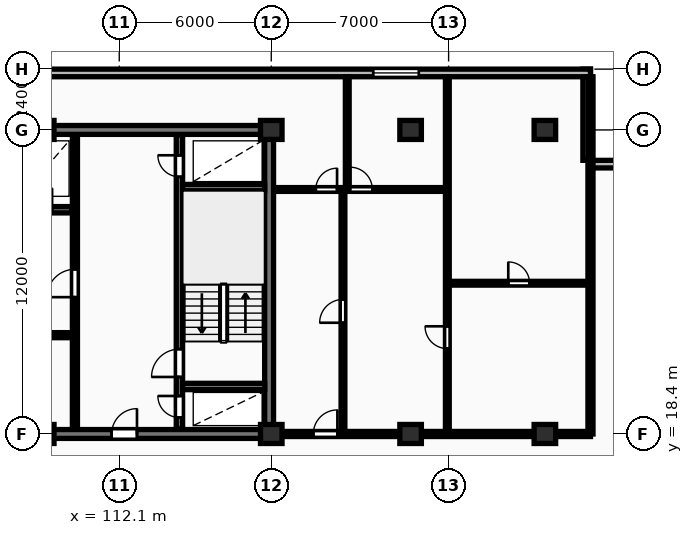
"""IFC4 building model, lengths in metres.
Left out: names, types, materials, properties, quantities, classifications, styles, units other than length and angle.
Written with IfcOpenShell. Run it as: python <this file> out.ifc"""

import sys

from ifc_helpers import new_model, si_unit, direction, frame, frame_2d, origin, origin_2d, place, context, subcontext, project, spatial, rectangle, extrude, element, fill, save


model = new_model("IFC4")
c1 = context("Model", 3, precision=1e-05, world=origin(), true_north=direction((0.0, 1.0)))
c2 = subcontext(c1, "Body", "Model", "MODEL_VIEW")
j1 = project(units=[si_unit("LENGTHUNIT", "METRE"), si_unit("PLANEANGLEUNIT", "RADIAN")], contexts=[c1])
p1 = place(None, origin())
s1 = spatial("IfcSite", under=j1, at=p1, CompositionType="ELEMENT")
p2 = place(p1, origin())
s2 = spatial("IfcBuilding", under=s1, at=p2, CompositionType="ELEMENT")
p3 = place(p2, frame((0.0, 0.0, 106.8)))
s3 = spatial("IfcBuildingStorey", under=s2, at=p3, CompositionType="ELEMENT", Elevation=106.8)
for number, where, z_axis, x_axis in (
    (1, (109.1, 18.4, 0.0), (0.0, 0.0, 1.0), (1.0, 0.0, 0.0)),
    (2, (109.1, 30.4, 0.0), (0.0, 0.0, 1.0), (1.0, 0.0, 0.0)),
    (3, (118.1, 18.4, 0.0), (0.0, 0.0, 1.0), (1.0, 0.0, 0.0)),
    (4, (118.1, 30.4, 0.0), (0.0, 0.0, 1.0), (1.0, 0.0, 0.0)),
    (5, (123.6, 18.4, 0.0), (0.0, 0.0, 1.0), (1.0, 0.0, 0.0)),
    (6, (123.6, 30.4, 0.0), (0.0, 0.0, 1.0), (1.0, 0.0, 0.0)),
    (7, (128.9, 18.4, 0.0), (0.0, 0.0, 1.0), (1.0, 0.0, 0.0)),
    (8, (128.9, 30.4, 0.0), (0.0, 0.0, 1.0), (1.0, 0.0, 0.0)),
):
    element("IfcColumn", number, at=place(p3, frame(where, z_axis=z_axis, x_axis=x_axis)), inside=s3, PredefinedType="COLUMN", context=c2, shape_type="SweptSolid", body=[
        extrude(rectangle(XDim=0.85, YDim=0.75, at=origin_2d()), origin(), (0.0, 0.0, 1.0), 3.25),
    ])
for number, where, z_axis, x_axis in (
    (9, (134.3, 29.05, 0.0), (0.0, 0.0, 1.0), (-1.0, 0.0, 0.0)),
    (10, (130.55, 29.2, 0.0), (0.0, 0.0, 1.0), (0.0, 1.0, 0.0)),
):
    element("IfcWall", number, at=place(p3, frame(where, z_axis=z_axis, x_axis=x_axis)), inside=s3, PredefinedType="STANDARD", context=c2, shape_type="SweptSolid", body=[
        extrude(rectangle(XDim=3.6, YDim=0.3, at=frame_2d((1.8, 0.0))), origin(), (0.0, 0.0, 1.0), 2.97),
    ])
p4 = place(p3, frame((130.7, 32.65, 0.0), z_axis=(0.0, 0.0, 1.0), x_axis=(-1.0, 0.0, 0.0)))
e11 = element("IfcWall", 11, at=p4, inside=s3, PredefinedType="STANDARD", context=c2, shape_type="SweptSolid", body=[
    extrude(rectangle(XDim=58.0, YDim=0.3, at=frame_2d((29.0, 0.0))), origin(), (0.0, 0.0, 1.0), 2.97),
])
p5 = place(p4, frame((50.125, 0.0, 0.85)))
e12 = element("IfcOpeningElement", 12, at=p5, cuts=e11, PredefinedType="OPENING", context=c2, shape_type="SweptSolid", body=[
    extrude(rectangle(XDim=1.8, YDim=1.8, at=frame_2d((0.9, 0.9))), frame((0.0, 0.16, 0.0), z_axis=(0.0, -1.0, 0.0), x_axis=(1.0, 0.0, 0.0)), (0.0, 0.0, 1.0), 0.32),
])
p6 = place(p4, frame((6.775, 0.0, 0.85)))
e13 = element("IfcOpeningElement", 13, at=p6, cuts=e11, PredefinedType="OPENING", context=c2, shape_type="SweptSolid", body=[
    extrude(rectangle(XDim=1.8, YDim=1.8, at=frame_2d((0.9, 0.9))), frame((0.0, 0.16, 0.0), z_axis=(0.0, -1.0, 0.0), x_axis=(1.0, 0.0, 0.0)), (0.0, 0.0, 1.0), 0.32),
])
p7 = place(p3, frame((81.925, 30.4, 0.0), z_axis=(0.0, 0.0, 1.0), x_axis=(1.0, 0.0, 0.0)))
e14 = element("IfcWall", 14, at=p7, inside=s3, PredefinedType="SHEAR", context=c2, shape_type="SweptSolid", body=[
    extrude(rectangle(XDim=36.265, YDim=0.35, at=frame_2d((18.132, 0.0))), origin(), (0.0, 0.0, 1.0), 3.25),
])
p8 = place(p3, frame((118.015, 18.575, 0.0), z_axis=(0.0, 0.0, 1.0), x_axis=(0.0, 1.0, 0.0)))
e15 = element("IfcWall", 15, at=p8, inside=s3, PredefinedType="SHEAR", context=c2, shape_type="SweptSolid", body=[
    extrude(rectangle(XDim=11.65, YDim=0.35, at=frame_2d((5.825, 0.0))), origin(), (0.0, 0.0, 1.0), 3.25),
])
p9 = place(p3, frame((81.925, 18.4, 0.0), z_axis=(0.0, 0.0, 1.0), x_axis=(1.0, 0.0, 0.0)))
e16 = element("IfcWall", 16, at=p9, inside=s3, PredefinedType="SHEAR", context=c2, shape_type="SweptSolid", body=[
    extrude(rectangle(XDim=36.265, YDim=0.35, at=frame_2d((18.132, 0.0))), origin(), (0.0, 0.0, 1.0), 3.25),
])
p10 = place(p9, frame((5.675, 0.0, 0.0)))
e17 = element("IfcOpeningElement", 17, at=p10, cuts=e16, PredefinedType="OPENING", context=c2, shape_type="SweptSolid", body=[
    extrude(rectangle(XDim=1.0, YDim=2.15, at=frame_2d((0.5, 1.075))), frame((0.0, 0.185, 0.0), z_axis=(0.0, -1.0, 0.0), x_axis=(1.0, 0.0, 0.0)), (0.0, 0.0, 1.0), 0.37),
])
p11 = place(p9, frame((21.925, 0.0, 0.0)))
e18 = element("IfcOpeningElement", 18, at=p11, cuts=e16, PredefinedType="OPENING", context=c2, shape_type="SweptSolid", body=[
    extrude(rectangle(XDim=1.5, YDim=2.2, at=frame_2d((0.75, 1.1))), frame((0.0, 0.185, 0.0), z_axis=(0.0, -1.0, 0.0), x_axis=(1.0, 0.0, 0.0)), (0.0, 0.0, 1.0), 0.37),
])
p12 = place(p9, frame((29.875, 0.0, 0.0)))
e19 = element("IfcOpeningElement", 19, at=p12, cuts=e16, PredefinedType="OPENING", context=c2, shape_type="SweptSolid", body=[
    extrude(rectangle(XDim=1.0, YDim=2.15, at=frame_2d((0.5, 1.075))), frame((0.0, 0.185, 0.0), z_axis=(0.0, -1.0, 0.0), x_axis=(1.0, 0.0, 0.0)), (0.0, 0.0, 1.0), 0.37),
])
p13 = place(p3, frame((99.68, 27.25, 0.0), z_axis=(0.0, 0.0, 1.0), x_axis=(1.0, 0.0, 0.0)))
e20 = element("IfcWall", 20, at=p13, inside=s3, PredefinedType="SHEAR", context=c2, shape_type="SweptSolid", body=[
    extrude(rectangle(XDim=10.54, YDim=0.25, at=frame_2d((5.27, 0.0))), origin(), (0.0, 0.0, 1.0), 3.25),
])
p14 = place(p13, frame((0.76, 0.0, 0.0)))
e21 = element("IfcOpeningElement", 21, at=p14, cuts=e20, PredefinedType="OPENING", context=c2, shape_type="SweptSolid", body=[
    extrude(rectangle(XDim=1.12, YDim=2.12, at=frame_2d((0.56, 1.06))), frame((0.0, 0.135, 0.0), z_axis=(0.0, -1.0, 0.0), x_axis=(1.0, 0.0, 0.0)), (0.0, 0.0, 1.0), 0.27),
])
p15 = place(p13, frame((3.56, 0.0, 0.0)))
e22 = element("IfcOpeningElement", 22, at=p15, cuts=e20, PredefinedType="OPENING", context=c2, shape_type="SweptSolid", body=[
    extrude(rectangle(XDim=1.12, YDim=2.12, at=frame_2d((0.56, 1.06))), frame((0.0, 0.135, 0.0), z_axis=(0.0, -1.0, 0.0), x_axis=(1.0, 0.0, 0.0)), (0.0, 0.0, 1.0), 0.27),
])
p16 = place(p13, frame((6.36, 0.0, 0.0)))
e23 = element("IfcOpeningElement", 23, at=p16, cuts=e20, PredefinedType="OPENING", context=c2, shape_type="SweptSolid", body=[
    extrude(rectangle(XDim=1.12, YDim=2.12, at=frame_2d((0.56, 1.06))), frame((0.0, 0.135, 0.0), z_axis=(0.0, -1.0, 0.0), x_axis=(1.0, 0.0, 0.0)), (0.0, 0.0, 1.0), 0.27),
])
p17 = place(p13, frame((8.92, 0.0, 0.0)))
e24 = element("IfcOpeningElement", 24, at=p17, cuts=e20, PredefinedType="OPENING", context=c2, shape_type="SweptSolid", body=[
    extrude(rectangle(XDim=0.85, YDim=2.05, at=frame_2d((0.425, 1.025))), frame((0.0, 0.135, 0.0), z_axis=(0.0, -1.0, 0.0), x_axis=(1.0, 0.0, 0.0)), (0.0, 0.0, 1.0), 0.27),
])
p18 = place(p3, frame((91.08, 22.3, 0.0), z_axis=(0.0, 0.0, 1.0), x_axis=(1.0, 0.0, 0.0)))
e25 = element("IfcWall", 25, at=p18, inside=s3, PredefinedType="PARTITIONING", context=c2, shape_type="SweptSolid", body=[
    extrude(rectangle(XDim=19.14, YDim=0.2, at=frame_2d((9.57, 0.0))), origin(), (0.0, 0.0, 1.0), 2.97),
])
p19 = place(p18, frame((1.15, 0.0, 0.0)))
e26 = element("IfcOpeningElement", 26, at=p19, cuts=e25, PredefinedType="OPENING", context=c2, shape_type="SweptSolid", body=[
    extrude(rectangle(XDim=0.85, YDim=2.05, at=frame_2d((0.425, 1.025))), frame((0.0, 0.11, 0.0), z_axis=(0.0, -1.0, 0.0), x_axis=(1.0, 0.0, 0.0)), (0.0, 0.0, 1.0), 0.22),
])
p20 = place(p18, frame((3.2, 0.0, 0.0)))
e27 = element("IfcOpeningElement", 27, at=p20, cuts=e25, PredefinedType="OPENING", context=c2, shape_type="SweptSolid", body=[
    extrude(rectangle(XDim=0.85, YDim=2.05, at=frame_2d((0.425, 1.025))), frame((0.0, 0.11, 0.0), z_axis=(0.0, -1.0, 0.0), x_axis=(1.0, 0.0, 0.0)), (0.0, 0.0, 1.0), 0.22),
])
p21 = place(p18, frame((12.72, 0.0, 0.0)))
e28 = element("IfcOpeningElement", 28, at=p21, cuts=e25, PredefinedType="OPENING", context=c2, shape_type="SweptSolid", body=[
    extrude(rectangle(XDim=1.5, YDim=2.2, at=frame_2d((0.75, 1.1))), frame((0.0, 0.11, 0.0), z_axis=(0.0, -1.0, 0.0), x_axis=(1.0, 0.0, 0.0)), (0.0, 0.0, 1.0), 0.22),
])
p22 = place(p18, frame((5.52, 0.0, 0.0)))
e29 = element("IfcOpeningElement", 29, at=p22, cuts=e25, PredefinedType="OPENING", context=c2, shape_type="SweptSolid", body=[
    extrude(rectangle(XDim=0.88, YDim=2.06, at=frame_2d((0.44, 1.03))), frame((0.0, 0.11, 0.0), z_axis=(0.0, -1.0, 0.0), x_axis=(1.0, 0.0, 0.0)), (0.0, 0.0, 1.0), 0.22),
])
p23 = place(p18, frame((7.67, 0.0, 0.0)))
e30 = element("IfcOpeningElement", 30, at=p23, cuts=e25, PredefinedType="OPENING", context=c2, shape_type="SweptSolid", body=[
    extrude(rectangle(XDim=0.88, YDim=2.06, at=frame_2d((0.44, 1.03))), frame((0.0, 0.11, 0.0), z_axis=(0.0, -1.0, 0.0), x_axis=(1.0, 0.0, 0.0)), (0.0, 0.0, 1.0), 0.22),
])
p24 = place(p18, frame((10.27, 0.0, 0.0)))
e31 = element("IfcOpeningElement", 31, at=p24, cuts=e25, PredefinedType="OPENING", context=c2, shape_type="SweptSolid", body=[
    extrude(rectangle(XDim=0.85, YDim=2.05, at=frame_2d((0.425, 1.025))), frame((0.0, 0.11, 0.0), z_axis=(0.0, -1.0, 0.0), x_axis=(1.0, 0.0, 0.0)), (0.0, 0.0, 1.0), 0.22),
])
p25 = place(p18, frame((15.92, 0.0, 0.0)))
e32 = element("IfcOpeningElement", 32, at=p25, cuts=e25, PredefinedType="OPENING", context=c2, shape_type="SweptSolid", body=[
    extrude(rectangle(XDim=0.96, YDim=2.1, at=frame_2d((0.48, 1.05))), frame((0.0, 0.11, 0.0), z_axis=(0.0, -1.0, 0.0), x_axis=(1.0, 0.0, 0.0)), (0.0, 0.0, 1.0), 0.22),
])
p26 = place(p3, frame((110.35, 18.6, 0.0), z_axis=(0.0, 0.0, 1.0), x_axis=(0.0, 1.0, 0.0)))
e33 = element("IfcWall", 33, at=p26, inside=s3, PredefinedType="PARTITIONING", context=c2, shape_type="SweptSolid", body=[
    extrude(rectangle(XDim=11.6, YDim=0.2, at=frame_2d((5.8, 0.0))), origin(), (0.0, 0.0, 1.0), 2.97),
])
p27 = place(p26, frame((5.2, 0.0, 0.0)))
e34 = element("IfcOpeningElement", 34, at=p27, cuts=e33, PredefinedType="OPENING", context=c2, shape_type="SweptSolid", body=[
    extrude(rectangle(XDim=1.1, YDim=2.15, at=frame_2d((0.55, 1.075))), frame((0.0, 0.11, 0.0), z_axis=(0.0, -1.0, 0.0), x_axis=(1.0, 0.0, 0.0)), (0.0, 0.0, 1.0), 0.22),
])
p28 = place(p3, frame((114.475, 18.6, 0.0), z_axis=(0.0, 0.0, 1.0), x_axis=(0.0, 1.0, 0.0)))
e35 = element("IfcWall", 35, at=p28, inside=s3, PredefinedType="SHEAR", context=c2, shape_type="SweptSolid", body=[
    extrude(rectangle(XDim=11.6, YDim=0.25, at=frame_2d((5.8, 0.0))), origin(), (0.0, 0.0, 1.0), 3.25),
])
p29 = place(p28, frame((0.45, 0.0, 0.0)))
e36 = element("IfcOpeningElement", 36, at=p29, cuts=e35, PredefinedType="OPENING", context=c2, shape_type="SweptSolid", body=[
    extrude(rectangle(XDim=0.85, YDim=2.05, at=frame_2d((0.425, 1.025))), frame((0.0, 0.135, 0.0), z_axis=(0.0, -1.0, 0.0), x_axis=(1.0, 0.0, 0.0)), (0.0, 0.0, 1.0), 0.27),
])
p30 = place(p28, frame((2.05, 0.0, 0.0)))
e37 = element("IfcOpeningElement", 37, at=p30, cuts=e35, PredefinedType="OPENING", context=c2, shape_type="SweptSolid", body=[
    extrude(rectangle(XDim=1.1, YDim=2.1, at=frame_2d((0.55, 1.05))), frame((0.0, 0.135, 0.0), z_axis=(0.0, -1.0, 0.0), x_axis=(1.0, 0.0, 0.0)), (0.0, 0.0, 1.0), 0.27),
])
p31 = place(p28, frame((9.95, 0.0, 0.0)))
e38 = element("IfcOpeningElement", 38, at=p31, cuts=e35, PredefinedType="OPENING", context=c2, shape_type="SweptSolid", body=[
    extrude(rectangle(XDim=0.85, YDim=2.05, at=frame_2d((0.425, 1.025))), frame((0.0, 0.135, 0.0), z_axis=(0.0, -1.0, 0.0), x_axis=(1.0, 0.0, 0.0)), (0.0, 0.0, 1.0), 0.27),
])
for number, where, z_axis, x_axis in (
    (39, (114.6, 20.275, 0.0), (0.0, 0.0, 1.0), (1.0, 0.0, 0.0)),
    (40, (114.6, 28.125, 0.0), (0.0, 0.0, 1.0), (1.0, 0.0, 0.0)),
):
    element("IfcWall", number, at=place(p3, frame(where, z_axis=z_axis, x_axis=x_axis)), inside=s3, PredefinedType="SHEAR", context=c2, shape_type="SweptSolid", body=[
        extrude(rectangle(XDim=3.24, YDim=0.25, at=frame_2d((1.62, 0.0))), origin(), (0.0, 0.0, 1.0), 3.25),
    ])
p32 = place(p3, frame((130.7, 18.4, 0.0), z_axis=(0.0, 0.0, 1.0), x_axis=(0.0, 1.0, 0.0)))
e41 = element("IfcWall", 41, at=p32, inside=s3, PredefinedType="PARTITIONING", context=c2, shape_type="SweptSolid", body=[
    extrude(rectangle(XDim=14.1, YDim=0.2, at=frame_2d((7.05, 0.0))), origin(), (0.0, 0.0, 1.0), 2.97),
])
p33 = place(p3, frame((125.05, 24.35, 0.0), z_axis=(0.0, 0.0, 1.0), x_axis=(1.0, 0.0, 0.0)))
e42 = element("IfcWall", 42, at=p33, inside=s3, PredefinedType="PARTITIONING", context=c2, shape_type="SweptSolid", body=[
    extrude(rectangle(XDim=5.65, YDim=0.15, at=frame_2d((2.825, 0.0))), origin(), (0.0, 0.0, 1.0), 2.97),
])
p34 = place(p33, frame((2.405, 0.0, 0.0)))
e43 = element("IfcOpeningElement", 43, at=p34, cuts=e42, PredefinedType="OPENING", context=c2, shape_type="SweptSolid", body=[
    extrude(rectangle(XDim=0.84, YDim=2.04, at=frame_2d((0.42, 1.02))), frame((0.0, 0.085, 0.0), z_axis=(0.0, -1.0, 0.0), x_axis=(1.0, 0.0, 0.0)), (0.0, 0.0, 1.0), 0.17),
])
p35 = place(p3, frame((125.05, 18.45, 0.0), z_axis=(0.0, 0.0, 1.0), x_axis=(0.0, 1.0, 0.0)))
e44 = element("IfcWall", 44, at=p35, inside=s3, PredefinedType="PARTITIONING", context=c2, shape_type="SweptSolid", body=[
    extrude(rectangle(XDim=14.05, YDim=0.15, at=frame_2d((7.025, 0.0))), origin(), (0.0, 0.0, 1.0), 2.97),
])
p36 = place(p35, frame((3.32, 0.0, 0.0)))
e45 = element("IfcOpeningElement", 45, at=p36, cuts=e44, PredefinedType="OPENING", context=c2, shape_type="SweptSolid", body=[
    extrude(rectangle(XDim=0.88, YDim=2.06, at=frame_2d((0.44, 1.03))), frame((0.0, 0.085, 0.0), z_axis=(0.0, -1.0, 0.0), x_axis=(1.0, 0.0, 0.0)), (0.0, 0.0, 1.0), 0.17),
])
p37 = place(p3, frame((120.93, 18.45, 0.0), z_axis=(0.0, 0.0, 1.0), x_axis=(0.0, 1.0, 0.0)))
e46 = element("IfcWall", 46, at=p37, inside=s3, PredefinedType="PARTITIONING", context=c2, shape_type="SweptSolid", body=[
    extrude(rectangle(XDim=9.6, YDim=0.15, at=frame_2d((4.8, 0.0))), origin(), (0.0, 0.0, 1.0), 2.97),
])
p38 = place(p37, frame((4.34, 0.0, 0.0)))
e47 = element("IfcOpeningElement", 47, at=p38, cuts=e46, PredefinedType="OPENING", context=c2, shape_type="SweptSolid", body=[
    extrude(rectangle(XDim=0.92, YDim=2.08, at=frame_2d((0.46, 1.04))), frame((0.0, 0.085, 0.0), z_axis=(0.0, -1.0, 0.0), x_axis=(1.0, 0.0, 0.0)), (0.0, 0.0, 1.0), 0.17),
])
p39 = place(p3, frame((121.1, 28.05, 0.0), z_axis=(0.0, 0.0, 1.0), x_axis=(0.0, 1.0, 0.0)))
e48 = element("IfcWall", 48, at=p39, inside=s3, PredefinedType="PARTITIONING", context=c2, shape_type="SweptSolid", body=[
    extrude(rectangle(XDim=4.45, YDim=0.15, at=frame_2d((2.225, 0.0))), origin(), (0.0, 0.0, 1.0), 2.97),
])
p40 = place(p3, frame((118.27, 28.05, 0.0), z_axis=(0.0, 0.0, 1.0), x_axis=(1.0, 0.0, 0.0)))
e49 = element("IfcWall", 49, at=p40, inside=s3, PredefinedType="PARTITIONING", context=c2, shape_type="SweptSolid", body=[
    extrude(rectangle(XDim=6.76, YDim=0.15, at=frame_2d((3.38, 0.0))), origin(), (0.0, 0.0, 1.0), 2.97),
])
p41 = place(p40, frame((1.587, 0.0, 0.0)))
e50 = element("IfcOpeningElement", 50, at=p41, cuts=e49, PredefinedType="OPENING", context=c2, shape_type="SweptSolid", body=[
    extrude(rectangle(XDim=0.84, YDim=2.04, at=frame_2d((0.42, 1.02))), frame((0.0, 0.085, 0.0), z_axis=(0.0, -1.0, 0.0), x_axis=(1.0, 0.0, 0.0)), (0.0, 0.0, 1.0), 0.17),
])
p42 = place(p40, frame((2.94, 0.0, 0.0)))
e51 = element("IfcOpeningElement", 51, at=p42, cuts=e49, PredefinedType="OPENING", context=c2, shape_type="SweptSolid", body=[
    extrude(rectangle(XDim=0.88, YDim=2.06, at=frame_2d((0.44, 1.03))), frame((0.0, 0.085, 0.0), z_axis=(0.0, -1.0, 0.0), x_axis=(1.0, 0.0, 0.0)), (0.0, 0.0, 1.0), 0.17),
])
p43 = place(p3, frame((118.25, 18.4, 0.0), z_axis=(0.0, 0.0, 1.0), x_axis=(1.0, 0.0, 0.0)))
e52 = element("IfcWall", 52, at=p43, inside=s3, PredefinedType="PARTITIONING", context=c2, shape_type="SweptSolid", body=[
    extrude(rectangle(XDim=12.45, YDim=0.2, at=frame_2d((6.225, 0.0))), origin(), (0.0, 0.0, 1.0), 2.358),
])
p44 = place(p43, frame((1.51, 0.0, 0.0)))
e53 = element("IfcOpeningElement", 53, at=p44, cuts=e52, PredefinedType="OPENING", context=c2, shape_type="SweptSolid", body=[
    extrude(rectangle(XDim=0.95, YDim=2.15, at=frame_2d((0.475, 1.075))), frame((0.0, 0.11, 0.0), z_axis=(0.0, -1.0, 0.0), x_axis=(1.0, 0.0, 0.0)), (0.0, 0.0, 1.0), 0.22),
])
p45 = place(p6, origin())
e54 = element("IfcWindow", 54, at=p45, inside=s3, PartitioningType="SINGLE_PANEL", PredefinedType="WINDOW", context=c2, shape_type="SweptSolid", body=[
    extrude(rectangle(XDim=1.8, YDim=1.8, at=frame_2d((0.9, 0.9))), frame((0.0, 0.03, 0.0), z_axis=(0.0, -1.0, 0.0), x_axis=(1.0, 0.0, 0.0)), (0.0, 0.0, 1.0), 0.06),
])
fill(e13, e54)
p46 = place(p12, origin())
e55 = element("IfcDoor", 55, at=p46, inside=s3, OperationType="SINGLE_SWING_RIGHT", PredefinedType="DOOR", context=c2, shape_type="SweptSolid", body=[
    extrude(rectangle(XDim=1.0, YDim=2.15, at=frame_2d((0.5, 1.075))), frame((0.0, 0.025, 0.0), z_axis=(0.0, -1.0, 0.0), x_axis=(1.0, 0.0, 0.0)), (0.0, 0.0, 1.0), 0.05),
])
fill(e19, e55)
p47 = place(p27, origin())
e56 = element("IfcDoor", 56, at=p47, inside=s3, OperationType="SINGLE_SWING_LEFT", PredefinedType="DOOR", context=c2, shape_type="SweptSolid", body=[
    extrude(rectangle(XDim=1.1, YDim=2.15, at=frame_2d((0.55, 1.075))), frame((0.0, 0.025, 0.0), z_axis=(0.0, -1.0, 0.0), x_axis=(1.0, 0.0, 0.0)), (0.0, 0.0, 1.0), 0.05),
])
fill(e34, e56)
p48 = place(p29, origin())
e57 = element("IfcDoor", 57, at=p48, inside=s3, OperationType="SINGLE_SWING_RIGHT", PredefinedType="DOOR", context=c2, shape_type="SweptSolid", body=[
    extrude(rectangle(XDim=0.85, YDim=2.05, at=frame_2d((0.425, 1.025))), frame((0.0, 0.025, 0.0), z_axis=(0.0, -1.0, 0.0), x_axis=(1.0, 0.0, 0.0)), (0.0, 0.0, 1.0), 0.05),
])
fill(e36, e57)
p49 = place(p30, origin())
e58 = element("IfcDoor", 58, at=p49, inside=s3, OperationType="SINGLE_SWING_LEFT", PredefinedType="DOOR", context=c2, shape_type="SweptSolid", body=[
    extrude(rectangle(XDim=1.1, YDim=2.1, at=frame_2d((0.55, 1.05))), frame((0.0, 0.025, 0.0), z_axis=(0.0, -1.0, 0.0), x_axis=(1.0, 0.0, 0.0)), (0.0, 0.0, 1.0), 0.05),
])
fill(e37, e58)
p50 = place(p31, origin())
e59 = element("IfcDoor", 59, at=p50, inside=s3, OperationType="SINGLE_SWING_RIGHT", PredefinedType="DOOR", context=c2, shape_type="SweptSolid", body=[
    extrude(rectangle(XDim=0.85, YDim=2.05, at=frame_2d((0.425, 1.025))), frame((0.0, 0.025, 0.0), z_axis=(0.0, -1.0, 0.0), x_axis=(1.0, 0.0, 0.0)), (0.0, 0.0, 1.0), 0.05),
])
fill(e38, e59)
p51 = place(p34, origin())
e60 = element("IfcDoor", 60, at=p51, inside=s3, OperationType="SINGLE_SWING_LEFT", PredefinedType="DOOR", context=c2, shape_type="SweptSolid", body=[
    extrude(rectangle(XDim=0.84, YDim=2.04, at=frame_2d((0.42, 1.02))), frame((0.0, 0.025, 0.0), z_axis=(0.0, -1.0, 0.0), x_axis=(1.0, 0.0, 0.0)), (0.0, 0.0, 1.0), 0.05),
])
fill(e43, e60)
p52 = place(p36, origin())
e61 = element("IfcDoor", 61, at=p52, inside=s3, OperationType="SINGLE_SWING_RIGHT", PredefinedType="DOOR", context=c2, shape_type="SweptSolid", body=[
    extrude(rectangle(XDim=0.88, YDim=2.06, at=frame_2d((0.44, 1.03))), frame((0.0, 0.025, 0.0), z_axis=(0.0, -1.0, 0.0), x_axis=(1.0, 0.0, 0.0)), (0.0, 0.0, 1.0), 0.05),
])
fill(e45, e61)
p53 = place(p38, origin())
e62 = element("IfcDoor", 62, at=p53, inside=s3, OperationType="SINGLE_SWING_LEFT", PredefinedType="DOOR", context=c2, shape_type="SweptSolid", body=[
    extrude(rectangle(XDim=0.92, YDim=2.08, at=frame_2d((0.46, 1.04))), frame((0.0, 0.025, 0.0), z_axis=(0.0, -1.0, 0.0), x_axis=(1.0, 0.0, 0.0)), (0.0, 0.0, 1.0), 0.05),
])
fill(e47, e62)
p54 = place(p41, origin())
e63 = element("IfcDoor", 63, at=p54, inside=s3, OperationType="SINGLE_SWING_RIGHT", PredefinedType="DOOR", context=c2, shape_type="SweptSolid", body=[
    extrude(rectangle(XDim=0.84, YDim=2.04, at=frame_2d((0.42, 1.02))), frame((0.0, 0.025, 0.0), z_axis=(0.0, -1.0, 0.0), x_axis=(1.0, 0.0, 0.0)), (0.0, 0.0, 1.0), 0.05),
])
fill(e50, e63)
p55 = place(p42, origin())
e64 = element("IfcDoor", 64, at=p55, inside=s3, OperationType="SINGLE_SWING_LEFT", PredefinedType="DOOR", context=c2, shape_type="SweptSolid", body=[
    extrude(rectangle(XDim=0.88, YDim=2.06, at=frame_2d((0.44, 1.03))), frame((0.0, 0.025, 0.0), z_axis=(0.0, -1.0, 0.0), x_axis=(1.0, 0.0, 0.0)), (0.0, 0.0, 1.0), 0.05),
])
fill(e51, e64)
p56 = place(p44, origin())
e65 = element("IfcDoor", 65, at=p56, inside=s3, OperationType="SINGLE_SWING_RIGHT", PredefinedType="DOOR", context=c2, shape_type="SweptSolid", body=[
    extrude(rectangle(XDim=0.95, YDim=2.15, at=frame_2d((0.475, 1.075))), frame((0.0, 0.025, 0.0), z_axis=(0.0, -1.0, 0.0), x_axis=(1.0, 0.0, 0.0)), (0.0, 0.0, 1.0), 0.05),
])
fill(e53, e65)
save(model, sys.argv[1])
